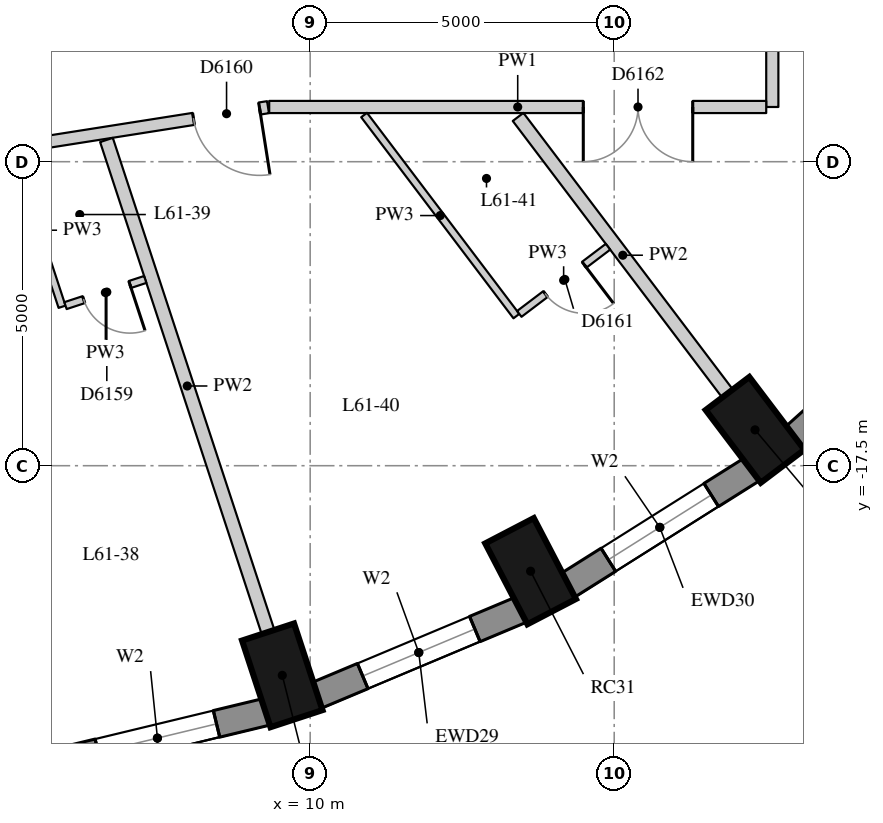
"""IFC4 building model, lengths in metres.
Left out: names, types, materials, properties, quantities, classifications, styles, units other than length and angle.
Written with IfcOpenShell. Run it as: python <this file> out.ifc"""

import sys

from ifc_helpers import new_model, si_unit, direction, frame, frame_2d, origin, origin_2d, place, context, subcontext, project, spatial, rectangle, extrude, element, fill, save


model = new_model("IFC4")
c1 = context("Model", 3, precision=1e-05, world=origin(), true_north=direction((0.0, 1.0)))
c2 = subcontext(c1, "Body", "Model", "MODEL_VIEW")
j1 = project(units=[si_unit("LENGTHUNIT", "METRE"), si_unit("PLANEANGLEUNIT", "RADIAN")], contexts=[c1])
p1 = place(None, origin())
s1 = spatial("IfcSite", under=j1, at=p1, CompositionType="ELEMENT")
p2 = place(p1, origin())
s2 = spatial("IfcBuilding", under=s1, at=p2, CompositionType="ELEMENT")
p3 = place(p2, frame((0.0, 0.0, 215.6)))
s3 = spatial("IfcBuildingStorey", under=s2, at=p3, CompositionType="ELEMENT", Elevation=215.6)
for number, where, z_axis, x_axis in (
    (1, (9.541, -20.948, 0.0), (0.0, 0.0, 1.0), (0.312, -0.95, 0.0)),
    (2, (13.625, -19.235, 0.0), (0.0, 0.0, 1.0), (0.462, -0.887, 0.0)),
    (3, (17.316, -16.911, 0.0), (0.0, 0.0, 1.0), (0.604, -0.797, 0.0)),
):
    element("IfcColumn", number, at=place(p3, frame(where, z_axis=z_axis, x_axis=x_axis)), inside=s3, PredefinedType="COLUMN", context=c2, shape_type="SweptSolid", body=[
        extrude(rectangle(XDim=1.5, YDim=0.9, at=origin_2d()), origin(), (0.0, 0.0, 1.0), 3.3),
    ])
p4 = place(p3, frame((5.691, -22.414, 0.0), z_axis=(0.0, 0.0, 1.0), x_axis=(0.9721584944, 0.234324266275, 0.0)))
e4 = element("IfcWall", 4, at=p4, inside=s3, PredefinedType="SOLIDWALL", context=c2, shape_type="SweptSolid", body=[
    extrude(rectangle(XDim=3.698, YDim=0.45, at=frame_2d((1.849, 0.0))), origin(), (0.0, 0.0, 1.0), 3.02),
])
p5 = place(p4, frame((0.849, 0.0, 0.4)))
e5 = element("IfcOpeningElement", 5, at=p5, cuts=e4, PredefinedType="OPENING", context=c2, shape_type="SweptSolid", body=[
    extrude(rectangle(XDim=2.0, YDim=1.75, at=frame_2d((1.0, 0.875))), frame((0.0, 0.235, 0.0), z_axis=(0.0, -1.0, 0.0), x_axis=(1.0, 0.0, 0.0)), (0.0, 0.0, 1.0), 0.47),
])
p6 = place(p3, frame((10.103, -21.279, 0.0), z_axis=(0.0, 0.0, 1.0), x_axis=(0.922168222612, 0.386789050006, 0.0)))
e6 = element("IfcWall", 6, at=p6, inside=s3, PredefinedType="SOLIDWALL", context=c2, shape_type="SweptSolid", body=[
    extrude(rectangle(XDim=3.651, YDim=0.45, at=frame_2d((1.825, 0.0))), origin(), (0.0, 0.0, 1.0), 3.02),
])
p7 = place(p6, frame((0.825, 0.0, 0.4)))
e7 = element("IfcOpeningElement", 7, at=p7, cuts=e6, PredefinedType="OPENING", context=c2, shape_type="SweptSolid", body=[
    extrude(rectangle(XDim=2.0, YDim=1.75, at=frame_2d((1.0, 0.875))), frame((0.0, 0.235, 0.0), z_axis=(0.0, -1.0, 0.0), x_axis=(1.0, 0.0, 0.0)), (0.0, 0.0, 1.0), 0.47),
])
p8 = place(p3, frame((14.232, -19.47, 0.0), z_axis=(0.0, 0.0, 1.0), x_axis=(0.84614984472, 0.532945063098, 0.0)))
e8 = element("IfcWall", 8, at=p8, inside=s3, PredefinedType="SOLIDWALL", context=c2, shape_type="SweptSolid", body=[
    extrude(rectangle(XDim=3.586, YDim=0.45, at=frame_2d((1.793, 0.0))), origin(), (0.0, 0.0, 1.0), 3.02),
])
p9 = place(p8, frame((0.793, 0.0, 0.4)))
e9 = element("IfcOpeningElement", 9, at=p9, cuts=e8, PredefinedType="OPENING", context=c2, shape_type="SweptSolid", body=[
    extrude(rectangle(XDim=2.0, YDim=1.75, at=frame_2d((1.0, 0.875))), frame((0.0, 0.235, 0.0), z_axis=(0.0, -1.0, 0.0), x_axis=(1.0, 0.0, 0.0)), (0.0, 0.0, 1.0), 0.47),
])
p10 = place(p3, frame((17.953, -17.04, 0.0), z_axis=(0.0, 0.0, 1.0), x_axis=(0.743442727602, 0.668799604348, 0.0)))
e10 = element("IfcWall", 10, at=p10, inside=s3, PredefinedType="SOLIDWALL", context=c2, shape_type="SweptSolid", body=[
    extrude(rectangle(XDim=3.513, YDim=0.45, at=frame_2d((1.756, 0.0))), origin(), (0.0, 0.0, 1.0), 3.02),
])
p11 = place(p3, frame((17.6, -3.8, 0.0), z_axis=(0.0, 0.0, 1.0), x_axis=(0.0, -1.0, 0.0)))
e11 = element("IfcWall", 11, at=p11, inside=s3, PredefinedType="PARTITIONING", context=c2, shape_type="SweptSolid", body=[
    extrude(rectangle(XDim=7.8, YDim=0.2, at=frame_2d((3.9, 0.0))), origin(), (0.0, 0.0, 1.0), 3.02),
])
p12 = place(p3, frame((17.5, -11.6, 0.0), z_axis=(0.0, 0.0, 1.0), x_axis=(-1.0, 0.0, 0.0)))
e12 = element("IfcWall", 12, at=p12, inside=s3, PredefinedType="PARTITIONING", context=c2, shape_type="SweptSolid", body=[
    extrude(rectangle(XDim=8.174, YDim=0.2, at=frame_2d((4.087, 0.0))), origin(), (0.0, 0.0, 1.0), 3.02),
])
p13 = place(p12, frame((1.208, 0.0, 0.0)))
e13 = element("IfcOpeningElement", 13, at=p13, cuts=e12, PredefinedType="OPENING", context=c2, shape_type="SweptSolid", body=[
    extrude(rectangle(XDim=1.8, YDim=2.1, at=frame_2d((0.9, 1.05))), frame((0.0, 0.11, 0.0), z_axis=(0.0, -1.0, 0.0), x_axis=(1.0, 0.0, 0.0)), (0.0, 0.0, 1.0), 0.22),
])
p14 = place(p3, frame((9.306, -11.603, 0.0), z_axis=(0.0, 0.0, 1.0), x_axis=(-0.987842562114, -0.155457622769, 0.0)))
e14 = element("IfcWall", 14, at=p14, inside=s3, PredefinedType="PARTITIONING", context=c2, shape_type="SweptSolid", body=[
    extrude(rectangle(XDim=11.893, YDim=0.2, at=frame_2d((5.947, 0.0))), origin(), (0.0, 0.0, 1.0), 3.02),
])
p15 = place(p14, frame((10.607, 0.0, 0.0)))
e15 = element("IfcOpeningElement", 15, at=p15, cuts=e14, PredefinedType="OPENING", context=c2, shape_type="SweptSolid", body=[
    extrude(rectangle(XDim=0.9, YDim=2.1, at=frame_2d((0.45, 1.05))), frame((0.0, 0.11, 0.0), z_axis=(0.0, -1.0, 0.0), x_axis=(1.0, 0.0, 0.0)), (0.0, 0.0, 1.0), 0.22),
])
p16 = place(p14, frame((5.829, 0.0, 0.0)))
e16 = element("IfcOpeningElement", 16, at=p16, cuts=e14, PredefinedType="OPENING", context=c2, shape_type="SweptSolid", body=[
    extrude(rectangle(XDim=0.9, YDim=2.1, at=frame_2d((0.45, 1.05))), frame((0.0, 0.11, 0.0), z_axis=(0.0, -1.0, 0.0), x_axis=(1.0, 0.0, 0.0)), (0.0, 0.0, 1.0), 0.22),
])
p17 = place(p14, frame((4.669, 0.0, 0.0)))
e17 = element("IfcOpeningElement", 17, at=p17, cuts=e14, PredefinedType="OPENING", context=c2, shape_type="SweptSolid", body=[
    extrude(rectangle(XDim=0.9, YDim=2.1, at=frame_2d((0.45, 1.05))), frame((0.0, 0.11, 0.0), z_axis=(0.0, -1.0, 0.0), x_axis=(1.0, 0.0, 0.0)), (0.0, 0.0, 1.0), 0.22),
])
p18 = place(p14, frame((0.14, 0.0, 0.0)))
e18 = element("IfcOpeningElement", 18, at=p18, cuts=e14, PredefinedType="OPENING", context=c2, shape_type="SweptSolid", body=[
    extrude(rectangle(XDim=1.1, YDim=2.1, at=frame_2d((0.55, 1.05))), frame((0.0, 0.11, 0.0), z_axis=(0.0, -1.0, 0.0), x_axis=(1.0, 0.0, 0.0)), (0.0, 0.0, 1.0), 0.22),
])
p19 = place(p3, frame((9.307, -20.235, 0.0), z_axis=(0.0, 0.0, 1.0), x_axis=(-0.311959631661, 0.950095357432, 0.0)))
e19 = element("IfcWall", 19, at=p19, inside=s3, PredefinedType="PARTITIONING", context=c2, shape_type="SweptSolid", body=[
    extrude(rectangle(XDim=8.518, YDim=0.22, at=frame_2d((4.259, 0.0))), origin(), (0.0, 0.0, 1.0), 3.02),
])
p20 = place(p3, frame((16.863, -16.312, 0.0), z_axis=(0.0, 0.0, 1.0), x_axis=(-0.603636051313, 0.797260006243, 0.0)))
e20 = element("IfcWall", 20, at=p20, inside=s3, PredefinedType="PARTITIONING", context=c2, shape_type="SweptSolid", body=[
    extrude(rectangle(XDim=5.706, YDim=0.22, at=frame_2d((2.853, 0.0))), origin(), (0.0, 0.0, 1.0), 3.02),
])
p21 = place(p3, frame((5.092, -12.368, 0.0), z_axis=(0.0, 0.0, 1.0), x_axis=(0.311969203188, -0.95009221461, 0.0)))
e21 = element("IfcWall", 21, at=p21, inside=s3, PredefinedType="PARTITIONING", context=c2, shape_type="SweptSolid", body=[
    extrude(rectangle(XDim=2.651, YDim=0.12, at=frame_2d((1.325, 0.0))), origin(), (0.0, 0.0, 1.0), 3.02),
])
p22 = place(p3, frame((10.887, -11.732, 0.0), z_axis=(0.0, 0.0, 1.0), x_axis=(0.603646932038, -0.797251767913, 0.0)))
e22 = element("IfcWall", 22, at=p22, inside=s3, PredefinedType="PARTITIONING", context=c2, shape_type="SweptSolid", body=[
    extrude(rectangle(XDim=4.149, YDim=0.12, at=frame_2d((2.074, 0.0))), origin(), (0.0, 0.0, 1.0), 3.02),
])
p23 = place(p3, frame((5.976, -14.867, 0.0), z_axis=(0.0, 0.0, 1.0), x_axis=(0.950123887932, 0.311872726573, 0.0)))
e23 = element("IfcWall", 23, at=p23, inside=s3, PredefinedType="PARTITIONING", context=c2, shape_type="SweptSolid", body=[
    extrude(rectangle(XDim=1.38, YDim=0.12, at=frame_2d((0.69, 0.0))), origin(), (0.0, 0.0, 1.0), 3.02),
])
p24 = place(p23, frame((0.315, 0.0, 0.0)))
e24 = element("IfcOpeningElement", 24, at=p24, cuts=e23, PredefinedType="OPENING", context=c2, shape_type="SweptSolid", body=[
    extrude(rectangle(XDim=0.8, YDim=2.1, at=frame_2d((0.4, 1.05))), frame((0.0, 0.07, 0.0), z_axis=(0.0, -1.0, 0.0), x_axis=(1.0, 0.0, 0.0)), (0.0, 0.0, 1.0), 0.14),
])
p25 = place(p3, frame((13.439, -15.003, 0.0), z_axis=(0.0, 0.0, 1.0), x_axis=(0.797238062708, 0.603665032422, 0.0)))
e25 = element("IfcWall", 25, at=p25, inside=s3, PredefinedType="PARTITIONING", context=c2, shape_type="SweptSolid", body=[
    extrude(rectangle(XDim=1.83, YDim=0.12, at=frame_2d((0.915, 0.0))), origin(), (0.0, 0.0, 1.0), 3.02),
])
p26 = place(p25, frame((0.54, 0.0, 0.0)))
e26 = element("IfcOpeningElement", 26, at=p26, cuts=e25, PredefinedType="OPENING", context=c2, shape_type="SweptSolid", body=[
    extrude(rectangle(XDim=0.8, YDim=2.1, at=frame_2d((0.4, 1.05))), frame((0.0, 0.07, 0.0), z_axis=(0.0, -1.0, 0.0), x_axis=(1.0, 0.0, 0.0)), (0.0, 0.0, 1.0), 0.14),
])
p27 = place(p5, origin())
e27 = element("IfcWindow", 27, at=p27, inside=s3, PartitioningType="SINGLE_PANEL", PredefinedType="WINDOW", context=c2, shape_type="SweptSolid", body=[
    extrude(rectangle(XDim=2.0, YDim=1.75, at=frame_2d((1.0, 0.875))), frame((0.0, 0.035, 0.0), z_axis=(0.0, -1.0, 0.0), x_axis=(1.0, 0.0, 0.0)), (0.0, 0.0, 1.0), 0.06),
])
fill(e5, e27)
p28 = place(p7, origin())
e28 = element("IfcWindow", 28, at=p28, inside=s3, PartitioningType="SINGLE_PANEL", PredefinedType="WINDOW", context=c2, shape_type="SweptSolid", body=[
    extrude(rectangle(XDim=2.0, YDim=1.75, at=frame_2d((1.0, 0.875))), frame((0.0, 0.035, 0.0), z_axis=(0.0, -1.0, 0.0), x_axis=(1.0, 0.0, 0.0)), (0.0, 0.0, 1.0), 0.06),
])
fill(e7, e28)
p29 = place(p9, origin())
e29 = element("IfcWindow", 29, at=p29, inside=s3, PartitioningType="SINGLE_PANEL", PredefinedType="WINDOW", context=c2, shape_type="SweptSolid", body=[
    extrude(rectangle(XDim=2.0, YDim=1.75, at=frame_2d((1.0, 0.875))), frame((0.0, 0.035, 0.0), z_axis=(0.0, -1.0, 0.0), x_axis=(1.0, 0.0, 0.0)), (0.0, 0.0, 1.0), 0.06),
])
fill(e9, e29)
p30 = place(p24, origin())
e30 = element("IfcDoor", 30, at=p30, inside=s3, OperationType="SINGLE_SWING_LEFT", PredefinedType="DOOR", context=c2, shape_type="SweptSolid", body=[
    extrude(rectangle(XDim=0.8, YDim=2.1, at=frame_2d((0.4, 1.05))), frame((0.0, 0.025, 0.0), z_axis=(0.0, -1.0, 0.0), x_axis=(1.0, 0.0, 0.0)), (0.0, 0.0, 1.0), 0.05),
])
fill(e24, e30)
p31 = place(p18, origin())
e31 = element("IfcDoor", 31, at=p31, inside=s3, OperationType="SINGLE_SWING_LEFT", PredefinedType="DOOR", context=c2, shape_type="SweptSolid", body=[
    extrude(rectangle(XDim=1.1, YDim=2.1, at=frame_2d((0.55, 1.05))), frame((0.0, 0.025, 0.0), z_axis=(0.0, -1.0, 0.0), x_axis=(1.0, 0.0, 0.0)), (0.0, 0.0, 1.0), 0.05),
])
fill(e18, e31)
p32 = place(p26, origin())
e32 = element("IfcDoor", 32, at=p32, inside=s3, OperationType="SINGLE_SWING_LEFT", PredefinedType="DOOR", context=c2, shape_type="SweptSolid", body=[
    extrude(rectangle(XDim=0.8, YDim=2.1, at=frame_2d((0.4, 1.05))), frame((0.0, 0.025, 0.0), z_axis=(0.0, -1.0, 0.0), x_axis=(1.0, 0.0, 0.0)), (0.0, 0.0, 1.0), 0.05),
])
fill(e26, e32)
p33 = place(p13, origin())
e33 = element("IfcDoor", 33, at=p33, inside=s3, OperationType="DOUBLE_DOOR_SINGLE_SWING", PredefinedType="DOOR", context=c2, shape_type="SweptSolid", body=[
    extrude(rectangle(XDim=1.8, YDim=2.1, at=frame_2d((0.9, 1.05))), frame((0.0, 0.025, 0.0), z_axis=(0.0, -1.0, 0.0), x_axis=(1.0, 0.0, 0.0)), (0.0, 0.0, 1.0), 0.05),
])
fill(e13, e33)
save(model, sys.argv[1])
